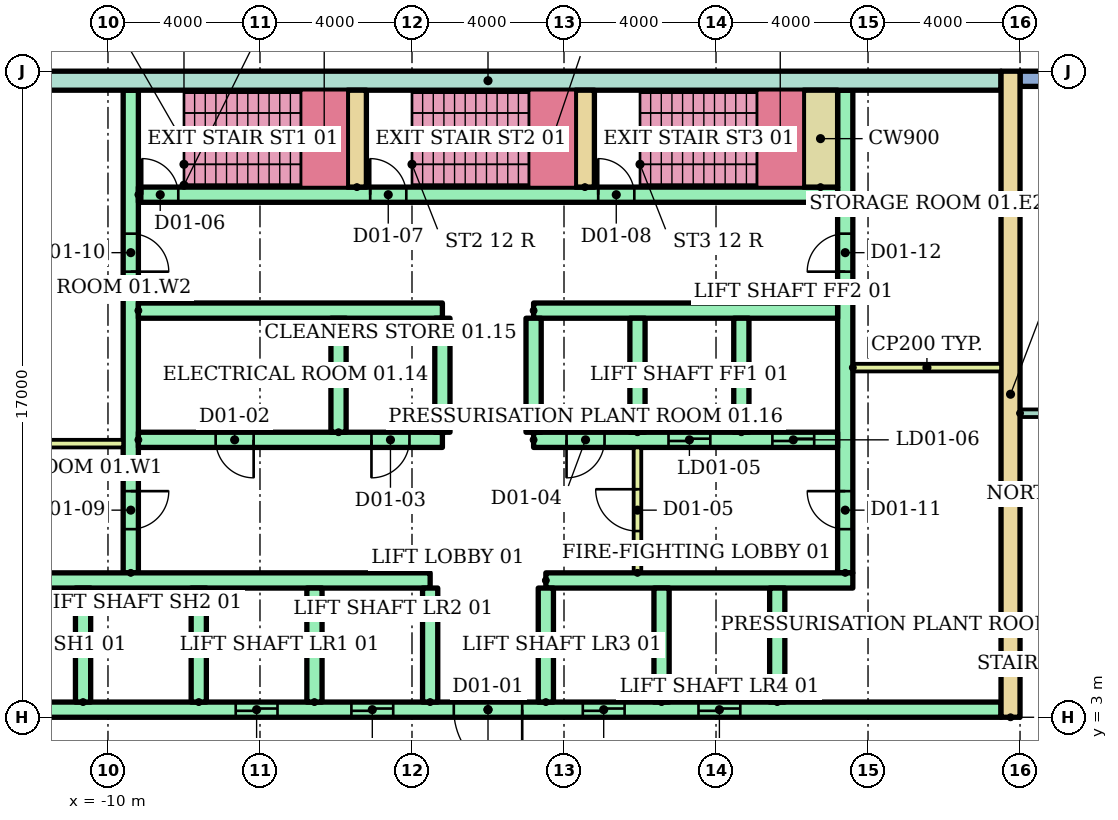
"""IFC4 building model, lengths in metres.
Left out: names, types, materials, properties, quantities, classifications, styles, units other than length and angle.
Written with IfcOpenShell. Run it as: python <this file> out.ifc"""

import sys

from ifc_helpers import new_model, si_unit, direction, frame, frame_2d, origin, place, context, subcontext, project, spatial, rectangle, extrude, element, fill, save


model = new_model("IFC4")
c1 = context("Model", 3, precision=1e-05, world=origin(), true_north=direction((0.0, 1.0)))
c2 = subcontext(c1, "Body", "Model", "MODEL_VIEW")
j1 = project(units=[si_unit("LENGTHUNIT", "METRE"), si_unit("PLANEANGLEUNIT", "RADIAN")], contexts=[c1])
p1 = place(None, origin())
s1 = spatial("IfcSite", under=j1, at=p1, CompositionType="ELEMENT")
p2 = place(p1, origin())
s2 = spatial("IfcBuilding", under=s1, at=p2, CompositionType="ELEMENT")
p3 = place(p2, frame((0.0, 0.0, 6.0)))
s3 = spatial("IfcBuildingStorey", under=s2, at=p3, CompositionType="ELEMENT", Elevation=6.0)
p4 = place(p3, frame((39.6, 19.8, 0.0), z_axis=(0.0, 0.0, 1.0), x_axis=(-1.0, 0.0, 0.0)))
e1 = element("IfcWall", 1, at=p4, inside=s3, PredefinedType="STANDARD", context=c2, shape_type="SweptSolid", body=[
    extrude(rectangle(XDim=25.6, YDim=0.4, at=frame_2d((12.8, 0.0))), origin(), (0.0, 0.0, 1.0), 3.7),
])
p5 = place(p4, frame((10.135, 0.0, 0.9)))
e2 = element("IfcOpeningElement", 2, at=p5, cuts=e1, PredefinedType="OPENING", context=c2, shape_type="SweptSolid", body=[
    extrude(rectangle(XDim=2.4, YDim=2.1, at=frame_2d((1.2, 1.05))), frame((0.0, 0.21, 0.0), z_axis=(0.0, -1.0, 0.0), x_axis=(1.0, 0.0, 0.0)), (0.0, 0.0, 1.0), 0.42),
])
p6 = place(p4, frame((14.665, 0.0, 0.9)))
e3 = element("IfcOpeningElement", 3, at=p6, cuts=e1, PredefinedType="OPENING", context=c2, shape_type="SweptSolid", body=[
    extrude(rectangle(XDim=2.4, YDim=2.1, at=frame_2d((1.2, 1.05))), frame((0.0, 0.21, 0.0), z_axis=(0.0, -1.0, 0.0), x_axis=(1.0, 0.0, 0.0)), (0.0, 0.0, 1.0), 0.42),
])
p7 = place(p4, frame((22.665, 0.0, 0.9)))
e4 = element("IfcOpeningElement", 4, at=p7, cuts=e1, PredefinedType="OPENING", context=c2, shape_type="SweptSolid", body=[
    extrude(rectangle(XDim=2.4, YDim=2.1, at=frame_2d((1.2, 1.05))), frame((0.0, 0.21, 0.0), z_axis=(0.0, -1.0, 0.0), x_axis=(1.0, 0.0, 0.0)), (0.0, 0.0, 1.0), 0.42),
])
p8 = place(p3, frame((13.75, 3.0, 0.0), z_axis=(0.0, 0.0, 1.0), x_axis=(0.0, 1.0, 0.0)))
e5 = element("IfcWall", 5, at=p8, inside=s3, PredefinedType="SHEAR", context=c2, shape_type="SweptSolid", body=[
    extrude(rectangle(XDim=17.0, YDim=0.5, at=frame_2d((8.5, 0.0))), origin(), (0.0, 0.0, 1.0), 3.7),
])
p9 = place(p3, frame((-13.5, 19.75, 0.0)))
e6 = element("IfcWall", 6, at=p9, inside=s3, PredefinedType="SHEAR", context=c2, shape_type="SweptSolid", body=[
    extrude(rectangle(XDim=27.0, YDim=0.5, at=frame_2d((13.5, 0.0))), origin(), (0.0, 0.0, 1.0), 3.7),
])
p10 = place(p3, frame((-9.4, 6.8, 0.0), z_axis=(0.0, 0.0, 1.0), x_axis=(0.0, 1.0, 0.0)))
e7 = element("IfcWall", 7, at=p10, inside=s3, PredefinedType="SHEAR", context=c2, shape_type="SweptSolid", body=[
    extrude(rectangle(XDim=12.7, YDim=0.4, at=frame_2d((6.35, 0.0))), origin(), (0.0, 0.0, 1.0), 3.7),
])
p11 = place(p10, frame((1.15, 0.0, 0.0)))
e8 = element("IfcOpeningElement", 8, at=p11, cuts=e7, PredefinedType="OPENING", context=c2, shape_type="SweptSolid", body=[
    extrude(rectangle(XDim=1.0, YDim=2.1, at=frame_2d((0.5, 1.05))), frame((0.0, 0.21, 0.0), z_axis=(0.0, -1.0, 0.0), x_axis=(1.0, 0.0, 0.0)), (0.0, 0.0, 1.0), 0.42),
])
p12 = place(p10, frame((7.925, 0.0, 0.0)))
e9 = element("IfcOpeningElement", 9, at=p12, cuts=e7, PredefinedType="OPENING", context=c2, shape_type="SweptSolid", body=[
    extrude(rectangle(XDim=1.0, YDim=2.1, at=frame_2d((0.5, 1.05))), frame((0.0, 0.21, 0.0), z_axis=(0.0, -1.0, 0.0), x_axis=(1.0, 0.0, 0.0)), (0.0, 0.0, 1.0), 0.42),
])
p13 = place(p3, frame((9.4, 6.8, 0.0), z_axis=(0.0, 0.0, 1.0), x_axis=(0.0, 1.0, 0.0)))
e10 = element("IfcWall", 10, at=p13, inside=s3, PredefinedType="SHEAR", context=c2, shape_type="SweptSolid", body=[
    extrude(rectangle(XDim=12.7, YDim=0.4, at=frame_2d((6.35, 0.0))), origin(), (0.0, 0.0, 1.0), 3.7),
])
p14 = place(p13, frame((1.15, 0.0, 0.0)))
e11 = element("IfcOpeningElement", 11, at=p14, cuts=e10, PredefinedType="OPENING", context=c2, shape_type="SweptSolid", body=[
    extrude(rectangle(XDim=1.0, YDim=2.1, at=frame_2d((0.5, 1.05))), frame((0.0, 0.21, 0.0), z_axis=(0.0, -1.0, 0.0), x_axis=(1.0, 0.0, 0.0)), (0.0, 0.0, 1.0), 0.42),
])
p15 = place(p13, frame((7.925, 0.0, 0.0)))
e12 = element("IfcOpeningElement", 12, at=p15, cuts=e10, PredefinedType="OPENING", context=c2, shape_type="SweptSolid", body=[
    extrude(rectangle(XDim=1.0, YDim=2.1, at=frame_2d((0.5, 1.05))), frame((0.0, 0.21, 0.0), z_axis=(0.0, -1.0, 0.0), x_axis=(1.0, 0.0, 0.0)), (0.0, 0.0, 1.0), 0.42),
])
p16 = place(p3, frame((-13.5, 3.2, 0.0)))
e13 = element("IfcWall", 13, at=p16, inside=s3, PredefinedType="SHEAR", context=c2, shape_type="SweptSolid", body=[
    extrude(rectangle(XDim=27.0, YDim=0.4, at=frame_2d((13.5, 0.0))), origin(), (0.0, 0.0, 1.0), 3.7),
])
p17 = place(p16, frame((6.861, 0.0, 0.0)))
e14 = element("IfcOpeningElement", 14, at=p17, cuts=e13, PredefinedType="OPENING", context=c2, shape_type="SweptSolid", body=[
    extrude(rectangle(XDim=1.1, YDim=2.1, at=frame_2d((0.55, 1.05))), frame((0.0, 0.21, 0.0), z_axis=(0.0, -1.0, 0.0), x_axis=(1.0, 0.0, 0.0)), (0.0, 0.0, 1.0), 0.42),
])
p18 = place(p16, frame((9.906, 0.0, 0.0)))
e15 = element("IfcOpeningElement", 15, at=p18, cuts=e13, PredefinedType="OPENING", context=c2, shape_type="SweptSolid", body=[
    extrude(rectangle(XDim=1.1, YDim=2.1, at=frame_2d((0.55, 1.05))), frame((0.0, 0.21, 0.0), z_axis=(0.0, -1.0, 0.0), x_axis=(1.0, 0.0, 0.0)), (0.0, 0.0, 1.0), 0.42),
])
p19 = place(p16, frame((15.994, 0.0, 0.0)))
e16 = element("IfcOpeningElement", 16, at=p19, cuts=e13, PredefinedType="OPENING", context=c2, shape_type="SweptSolid", body=[
    extrude(rectangle(XDim=1.1, YDim=2.1, at=frame_2d((0.55, 1.05))), frame((0.0, 0.21, 0.0), z_axis=(0.0, -1.0, 0.0), x_axis=(1.0, 0.0, 0.0)), (0.0, 0.0, 1.0), 0.42),
])
p20 = place(p16, frame((19.039, 0.0, 0.0)))
e17 = element("IfcOpeningElement", 17, at=p20, cuts=e13, PredefinedType="OPENING", context=c2, shape_type="SweptSolid", body=[
    extrude(rectangle(XDim=1.1, YDim=2.1, at=frame_2d((0.55, 1.05))), frame((0.0, 0.21, 0.0), z_axis=(0.0, -1.0, 0.0), x_axis=(1.0, 0.0, 0.0)), (0.0, 0.0, 1.0), 0.42),
])
p21 = place(p16, frame((12.6, 0.0, 0.0)))
e18 = element("IfcOpeningElement", 18, at=p21, cuts=e13, PredefinedType="OPENING", context=c2, shape_type="SweptSolid", body=[
    extrude(rectangle(XDim=1.8, YDim=2.1, at=frame_2d((0.9, 1.05))), frame((0.0, 0.21, 0.0), z_axis=(0.0, -1.0, 0.0), x_axis=(1.0, 0.0, 0.0)), (0.0, 0.0, 1.0), 0.42),
])
p22 = place(p3, frame((-13.5, 6.6, 0.0)))
e19 = element("IfcWall", 19, at=p22, inside=s3, PredefinedType="SHEAR", context=c2, shape_type="SweptSolid", body=[
    extrude(rectangle(XDim=11.978, YDim=0.4, at=frame_2d((5.989, 0.0))), origin(), (0.0, 0.0, 1.0), 3.7),
])
p23 = place(p3, frame((1.522, 6.6, 0.0)))
e20 = element("IfcWall", 20, at=p23, inside=s3, PredefinedType="SHEAR", context=c2, shape_type="SweptSolid", body=[
    extrude(rectangle(XDim=8.078, YDim=0.4, at=frame_2d((4.039, 0.0))), origin(), (0.0, 0.0, 1.0), 3.7),
])
for number, where, z_axis, x_axis in (
    (21, (-10.656, 3.4, 0.0), (0.0, 0.0, 1.0), (0.0, 1.0, 0.0)),
    (22, (-7.611, 3.4, 0.0), (0.0, 0.0, 1.0), (0.0, 1.0, 0.0)),
    (23, (-4.567, 3.4, 0.0), (0.0, 0.0, 1.0), (0.0, 1.0, 0.0)),
    (24, (-1.522, 3.4, 0.0), (0.0, 0.0, 1.0), (0.0, 1.0, 0.0)),
    (25, (1.522, 3.4, 0.0), (0.0, 0.0, 1.0), (0.0, 1.0, 0.0)),
    (26, (4.567, 3.4, 0.0), (0.0, 0.0, 1.0), (0.0, 1.0, 0.0)),
    (27, (7.611, 3.4, 0.0), (0.0, 0.0, 1.0), (0.0, 1.0, 0.0)),
):
    element("IfcWall", number, at=place(p3, frame(where, z_axis=z_axis, x_axis=x_axis)), inside=s3, PredefinedType="SHEAR", context=c2, shape_type="SweptSolid", body=[
        extrude(rectangle(XDim=3.0, YDim=0.4, at=frame_2d((1.5, 0.0))), origin(), (0.0, 0.0, 1.0), 3.7),
    ])
p24 = place(p3, frame((-9.2, 10.3, 0.0)))
e28 = element("IfcWall", 28, at=p24, inside=s3, PredefinedType="SHEAR", context=c2, shape_type="SweptSolid", body=[
    extrude(rectangle(XDim=8.0, YDim=0.4, at=frame_2d((4.0, 0.0))), origin(), (0.0, 0.0, 1.0), 3.7),
])
p25 = place(p24, frame((2.033, 0.0, 0.0)))
e29 = element("IfcOpeningElement", 29, at=p25, cuts=e28, PredefinedType="OPENING", context=c2, shape_type="SweptSolid", body=[
    extrude(rectangle(XDim=1.0, YDim=2.1, at=frame_2d((0.5, 1.05))), frame((0.0, 0.21, 0.0), z_axis=(0.0, -1.0, 0.0), x_axis=(1.0, 0.0, 0.0)), (0.0, 0.0, 1.0), 0.42),
])
p26 = place(p24, frame((6.133, 0.0, 0.0)))
e30 = element("IfcOpeningElement", 30, at=p26, cuts=e28, PredefinedType="OPENING", context=c2, shape_type="SweptSolid", body=[
    extrude(rectangle(XDim=1.0, YDim=2.1, at=frame_2d((0.5, 1.05))), frame((0.0, 0.21, 0.0), z_axis=(0.0, -1.0, 0.0), x_axis=(1.0, 0.0, 0.0)), (0.0, 0.0, 1.0), 0.42),
])
p27 = place(p3, frame((-9.2, 13.7, 0.0)))
e31 = element("IfcWall", 31, at=p27, inside=s3, PredefinedType="SHEAR", context=c2, shape_type="SweptSolid", body=[
    extrude(rectangle(XDim=8.0, YDim=0.4, at=frame_2d((4.0, 0.0))), origin(), (0.0, 0.0, 1.0), 3.7),
])
p28 = place(p3, frame((1.2, 10.3, 0.0)))
e32 = element("IfcWall", 32, at=p28, inside=s3, PredefinedType="SHEAR", context=c2, shape_type="SweptSolid", body=[
    extrude(rectangle(XDim=8.0, YDim=0.4, at=frame_2d((4.0, 0.0))), origin(), (0.0, 0.0, 1.0), 3.7),
])
p29 = place(p28, frame((3.55, 0.0, 0.0)))
e33 = element("IfcOpeningElement", 33, at=p29, cuts=e32, PredefinedType="OPENING", context=c2, shape_type="SweptSolid", body=[
    extrude(rectangle(XDim=1.1, YDim=2.1, at=frame_2d((0.55, 1.05))), frame((0.0, 0.21, 0.0), z_axis=(0.0, -1.0, 0.0), x_axis=(1.0, 0.0, 0.0)), (0.0, 0.0, 1.0), 0.42),
])
p30 = place(p28, frame((6.283, 0.0, 0.0)))
e34 = element("IfcOpeningElement", 34, at=p30, cuts=e32, PredefinedType="OPENING", context=c2, shape_type="SweptSolid", body=[
    extrude(rectangle(XDim=1.1, YDim=2.1, at=frame_2d((0.55, 1.05))), frame((0.0, 0.21, 0.0), z_axis=(0.0, -1.0, 0.0), x_axis=(1.0, 0.0, 0.0)), (0.0, 0.0, 1.0), 0.42),
])
p31 = place(p28, frame((0.867, 0.0, 0.0)))
e35 = element("IfcOpeningElement", 35, at=p31, cuts=e32, PredefinedType="OPENING", context=c2, shape_type="SweptSolid", body=[
    extrude(rectangle(XDim=1.0, YDim=2.1, at=frame_2d((0.5, 1.05))), frame((0.0, 0.21, 0.0), z_axis=(0.0, -1.0, 0.0), x_axis=(1.0, 0.0, 0.0)), (0.0, 0.0, 1.0), 0.42),
])
p32 = place(p3, frame((1.2, 13.7, 0.0)))
e36 = element("IfcWall", 36, at=p32, inside=s3, PredefinedType="SHEAR", context=c2, shape_type="SweptSolid", body=[
    extrude(rectangle(XDim=8.0, YDim=0.4, at=frame_2d((4.0, 0.0))), origin(), (0.0, 0.0, 1.0), 3.7),
])
for number, where, z_axis, x_axis in (
    (37, (-3.933, 10.5, 0.0), (0.0, 0.0, 1.0), (0.0, 1.0, 0.0)),
    (38, (-1.2, 10.5, 0.0), (0.0, 0.0, 1.0), (0.0, 1.0, 0.0)),
    (39, (1.2, 10.5, 0.0), (0.0, 0.0, 1.0), (0.0, 1.0, 0.0)),
    (40, (3.933, 10.5, 0.0), (0.0, 0.0, 1.0), (0.0, 1.0, 0.0)),
    (41, (6.667, 10.5, 0.0), (0.0, 0.0, 1.0), (0.0, 1.0, 0.0)),
):
    element("IfcWall", number, at=place(p3, frame(where, z_axis=z_axis, x_axis=x_axis)), inside=s3, PredefinedType="SHEAR", context=c2, shape_type="SweptSolid", body=[
        extrude(rectangle(XDim=3.0, YDim=0.4, at=frame_2d((1.5, 0.0))), origin(), (0.0, 0.0, 1.0), 3.7),
    ])
p33 = place(p3, frame((3.933, 6.8, 0.0), z_axis=(0.0, 0.0, 1.0), x_axis=(0.0, 1.0, 0.0)))
e42 = element("IfcWall", 42, at=p33, inside=s3, PredefinedType="PARTITIONING", context=c2, shape_type="SweptSolid", body=[
    extrude(rectangle(XDim=3.3, YDim=0.2, at=frame_2d((1.65, 0.0))), origin(), (0.0, 0.0, 1.0), 3.7),
])
p34 = place(p33, frame((1.1, 0.0, 0.0)))
e43 = element("IfcOpeningElement", 43, at=p34, cuts=e42, PredefinedType="OPENING", context=c2, shape_type="SweptSolid", body=[
    extrude(rectangle(XDim=1.1, YDim=2.1, at=frame_2d((0.55, 1.05))), frame((0.0, 0.11, 0.0), z_axis=(0.0, -1.0, 0.0), x_axis=(1.0, 0.0, 0.0)), (0.0, 0.0, 1.0), 0.22),
])
p35 = place(p3, frame((-9.2, 16.75, 0.0)))
e44 = element("IfcWall", 44, at=p35, inside=s3, PredefinedType="SHEAR", context=c2, shape_type="SweptSolid", body=[
    extrude(rectangle(XDim=18.4, YDim=0.4, at=frame_2d((9.2, 0.0))), origin(), (0.0, 0.0, 1.0), 3.7),
])
p36 = place(p35, frame((0.1, 0.0, 0.0)))
e45 = element("IfcOpeningElement", 45, at=p36, cuts=e44, PredefinedType="OPENING", context=c2, shape_type="SweptSolid", body=[
    extrude(rectangle(XDim=0.95, YDim=2.1, at=frame_2d((0.475, 1.05))), frame((0.0, 0.21, 0.0), z_axis=(0.0, -1.0, 0.0), x_axis=(1.0, 0.0, 0.0)), (0.0, 0.0, 1.0), 0.42),
])
p37 = place(p35, frame((6.1, 0.0, 0.0)))
e46 = element("IfcOpeningElement", 46, at=p37, cuts=e44, PredefinedType="OPENING", context=c2, shape_type="SweptSolid", body=[
    extrude(rectangle(XDim=0.95, YDim=2.1, at=frame_2d((0.475, 1.05))), frame((0.0, 0.21, 0.0), z_axis=(0.0, -1.0, 0.0), x_axis=(1.0, 0.0, 0.0)), (0.0, 0.0, 1.0), 0.42),
])
p38 = place(p35, frame((12.1, 0.0, 0.0)))
e47 = element("IfcOpeningElement", 47, at=p38, cuts=e44, PredefinedType="OPENING", context=c2, shape_type="SweptSolid", body=[
    extrude(rectangle(XDim=0.95, YDim=2.1, at=frame_2d((0.475, 1.05))), frame((0.0, 0.21, 0.0), z_axis=(0.0, -1.0, 0.0), x_axis=(1.0, 0.0, 0.0)), (0.0, 0.0, 1.0), 0.42),
])
for number, where, z_axis, x_axis in (
    (48, (-3.45, 16.95, 0.0), (0.0, 0.0, 1.0), (0.0, 1.0, 0.0)),
    (49, (2.55, 16.95, 0.0), (0.0, 0.0, 1.0), (0.0, 1.0, 0.0)),
):
    element("IfcWall", number, at=place(p3, frame(where, z_axis=z_axis, x_axis=x_axis)), inside=s3, PredefinedType="SHEAR", context=c2, shape_type="SweptSolid", body=[
        extrude(rectangle(XDim=2.55, YDim=0.5, at=frame_2d((1.275, 0.0))), origin(), (0.0, 0.0, 1.0), 3.7),
    ])
p39 = place(p3, frame((8.75, 16.95, 0.0), z_axis=(0.0, 0.0, 1.0), x_axis=(0.0, 1.0, 0.0)))
e50 = element("IfcWall", 50, at=p39, inside=s3, PredefinedType="SHEAR", context=c2, shape_type="SweptSolid", body=[
    extrude(rectangle(XDim=2.55, YDim=0.9, at=frame_2d((1.275, 0.0))), origin(), (0.0, 0.0, 1.0), 3.7),
])
for number, where in (
    (51, (-13.5, 10.2, 0.0)),
    (52, (9.6, 12.2, 0.0)),
):
    element("IfcWall", number, at=place(p3, frame(where)), inside=s3, PredefinedType="PARTITIONING", context=c2, shape_type="SweptSolid", body=[
        extrude(rectangle(XDim=3.9, YDim=0.2, at=frame_2d((1.95, 0.0))), origin(), (0.0, 0.0, 1.0), 3.7),
    ])
p40 = place(p3, frame((14.0, 11.0, 0.0)))
e53 = element("IfcWall", 53, at=p40, inside=s3, PredefinedType="PARTITIONING", context=c2, shape_type="SweptSolid", body=[
    extrude(rectangle(XDim=3.5, YDim=0.2, at=frame_2d((1.75, 0.0))), origin(), (0.0, 0.0, 1.0), 3.7),
])
p41 = place(p17, origin())
e54 = element("IfcDoor", 54, at=p41, inside=s3, OperationType="SLIDING_TO_LEFT", PredefinedType="DOOR", context=c2, shape_type="SweptSolid", body=[
    extrude(rectangle(XDim=1.1, YDim=2.1, at=frame_2d((0.55, 1.05))), frame((0.0, 0.025, 0.0), z_axis=(0.0, -1.0, 0.0), x_axis=(1.0, 0.0, 0.0)), (0.0, 0.0, 1.0), 0.05),
])
fill(e14, e54)
p42 = place(p18, origin())
e55 = element("IfcDoor", 55, at=p42, inside=s3, OperationType="SLIDING_TO_LEFT", PredefinedType="DOOR", context=c2, shape_type="SweptSolid", body=[
    extrude(rectangle(XDim=1.1, YDim=2.1, at=frame_2d((0.55, 1.05))), frame((0.0, 0.025, 0.0), z_axis=(0.0, -1.0, 0.0), x_axis=(1.0, 0.0, 0.0)), (0.0, 0.0, 1.0), 0.05),
])
fill(e15, e55)
p43 = place(p19, origin())
e56 = element("IfcDoor", 56, at=p43, inside=s3, OperationType="SLIDING_TO_LEFT", PredefinedType="DOOR", context=c2, shape_type="SweptSolid", body=[
    extrude(rectangle(XDim=1.1, YDim=2.1, at=frame_2d((0.55, 1.05))), frame((0.0, 0.025, 0.0), z_axis=(0.0, -1.0, 0.0), x_axis=(1.0, 0.0, 0.0)), (0.0, 0.0, 1.0), 0.05),
])
fill(e16, e56)
p44 = place(p20, origin())
e57 = element("IfcDoor", 57, at=p44, inside=s3, OperationType="SLIDING_TO_LEFT", PredefinedType="DOOR", context=c2, shape_type="SweptSolid", body=[
    extrude(rectangle(XDim=1.1, YDim=2.1, at=frame_2d((0.55, 1.05))), frame((0.0, 0.025, 0.0), z_axis=(0.0, -1.0, 0.0), x_axis=(1.0, 0.0, 0.0)), (0.0, 0.0, 1.0), 0.05),
])
fill(e17, e57)
p45 = place(p21, frame((1.8, 0.0, 0.0), z_axis=(0.0, 0.0, 1.0), x_axis=(-1.0, 0.0, 0.0)))
e58 = element("IfcDoor", 58, at=p45, inside=s3, OperationType="DOUBLE_DOOR_SINGLE_SWING", PredefinedType="DOOR", context=c2, shape_type="SweptSolid", body=[
    extrude(rectangle(XDim=1.8, YDim=2.1, at=frame_2d((0.9, 1.05))), frame((0.0, 0.025, 0.0), z_axis=(0.0, -1.0, 0.0), x_axis=(1.0, 0.0, 0.0)), (0.0, 0.0, 1.0), 0.05),
])
fill(e18, e58)
p46 = place(p29, origin())
e59 = element("IfcDoor", 59, at=p46, inside=s3, OperationType="SLIDING_TO_LEFT", PredefinedType="DOOR", context=c2, shape_type="SweptSolid", body=[
    extrude(rectangle(XDim=1.1, YDim=2.1, at=frame_2d((0.55, 1.05))), frame((0.0, 0.025, 0.0), z_axis=(0.0, -1.0, 0.0), x_axis=(1.0, 0.0, 0.0)), (0.0, 0.0, 1.0), 0.05),
])
fill(e33, e59)
p47 = place(p30, origin())
e60 = element("IfcDoor", 60, at=p47, inside=s3, OperationType="SLIDING_TO_LEFT", PredefinedType="DOOR", context=c2, shape_type="SweptSolid", body=[
    extrude(rectangle(XDim=1.1, YDim=2.1, at=frame_2d((0.55, 1.05))), frame((0.0, 0.025, 0.0), z_axis=(0.0, -1.0, 0.0), x_axis=(1.0, 0.0, 0.0)), (0.0, 0.0, 1.0), 0.05),
])
fill(e34, e60)
p48 = place(p25, frame((1.0, 0.0, 0.0), z_axis=(0.0, 0.0, 1.0), x_axis=(-1.0, 0.0, 0.0)))
e61 = element("IfcDoor", 61, at=p48, inside=s3, OperationType="SINGLE_SWING_RIGHT", PredefinedType="DOOR", context=c2, shape_type="SweptSolid", body=[
    extrude(rectangle(XDim=1.0, YDim=2.1, at=frame_2d((0.5, 1.05))), frame((0.0, 0.025, 0.0), z_axis=(0.0, -1.0, 0.0), x_axis=(1.0, 0.0, 0.0)), (0.0, 0.0, 1.0), 0.05),
])
fill(e29, e61)
p49 = place(p26, frame((1.0, 0.0, 0.0), z_axis=(0.0, 0.0, 1.0), x_axis=(-1.0, 0.0, 0.0)))
e62 = element("IfcDoor", 62, at=p49, inside=s3, OperationType="SINGLE_SWING_LEFT", PredefinedType="DOOR", context=c2, shape_type="SweptSolid", body=[
    extrude(rectangle(XDim=1.0, YDim=2.1, at=frame_2d((0.5, 1.05))), frame((0.0, 0.025, 0.0), z_axis=(0.0, -1.0, 0.0), x_axis=(1.0, 0.0, 0.0)), (0.0, 0.0, 1.0), 0.05),
])
fill(e30, e62)
p50 = place(p31, frame((1.0, 0.0, 0.0), z_axis=(0.0, 0.0, 1.0), x_axis=(-1.0, 0.0, 0.0)))
e63 = element("IfcDoor", 63, at=p50, inside=s3, OperationType="SINGLE_SWING_LEFT", PredefinedType="DOOR", context=c2, shape_type="SweptSolid", body=[
    extrude(rectangle(XDim=1.0, YDim=2.1, at=frame_2d((0.5, 1.05))), frame((0.0, 0.025, 0.0), z_axis=(0.0, -1.0, 0.0), x_axis=(1.0, 0.0, 0.0)), (0.0, 0.0, 1.0), 0.05),
])
fill(e35, e63)
p51 = place(p34, origin())
e64 = element("IfcDoor", 64, at=p51, inside=s3, OperationType="SINGLE_SWING_RIGHT", PredefinedType="DOOR", context=c2, shape_type="SweptSolid", body=[
    extrude(rectangle(XDim=1.1, YDim=2.1, at=frame_2d((0.55, 1.05))), frame((0.0, 0.025, 0.0), z_axis=(0.0, -1.0, 0.0), x_axis=(1.0, 0.0, 0.0)), (0.0, 0.0, 1.0), 0.05),
])
fill(e43, e64)
p52 = place(p36, origin())
e65 = element("IfcDoor", 65, at=p52, inside=s3, OperationType="SINGLE_SWING_LEFT", PredefinedType="DOOR", context=c2, shape_type="SweptSolid", body=[
    extrude(rectangle(XDim=0.95, YDim=2.1, at=frame_2d((0.475, 1.05))), frame((0.0, 0.025, 0.0), z_axis=(0.0, -1.0, 0.0), x_axis=(1.0, 0.0, 0.0)), (0.0, 0.0, 1.0), 0.05),
])
fill(e45, e65)
p53 = place(p37, origin())
e66 = element("IfcDoor", 66, at=p53, inside=s3, OperationType="SINGLE_SWING_LEFT", PredefinedType="DOOR", context=c2, shape_type="SweptSolid", body=[
    extrude(rectangle(XDim=0.95, YDim=2.1, at=frame_2d((0.475, 1.05))), frame((0.0, 0.025, 0.0), z_axis=(0.0, -1.0, 0.0), x_axis=(1.0, 0.0, 0.0)), (0.0, 0.0, 1.0), 0.05),
])
fill(e46, e66)
p54 = place(p38, origin())
e67 = element("IfcDoor", 67, at=p54, inside=s3, OperationType="SINGLE_SWING_LEFT", PredefinedType="DOOR", context=c2, shape_type="SweptSolid", body=[
    extrude(rectangle(XDim=0.95, YDim=2.1, at=frame_2d((0.475, 1.05))), frame((0.0, 0.025, 0.0), z_axis=(0.0, -1.0, 0.0), x_axis=(1.0, 0.0, 0.0)), (0.0, 0.0, 1.0), 0.05),
])
fill(e47, e67)
p55 = place(p11, frame((1.0, 0.0, 0.0), z_axis=(0.0, 0.0, 1.0), x_axis=(-1.0, 0.0, 0.0)))
e68 = element("IfcDoor", 68, at=p55, inside=s3, OperationType="SINGLE_SWING_RIGHT", PredefinedType="DOOR", context=c2, shape_type="SweptSolid", body=[
    extrude(rectangle(XDim=1.0, YDim=2.1, at=frame_2d((0.5, 1.05))), frame((0.0, 0.025, 0.0), z_axis=(0.0, -1.0, 0.0), x_axis=(1.0, 0.0, 0.0)), (0.0, 0.0, 1.0), 0.05),
])
fill(e8, e68)
p56 = place(p12, frame((1.0, 0.0, 0.0), z_axis=(0.0, 0.0, 1.0), x_axis=(-1.0, 0.0, 0.0)))
e69 = element("IfcDoor", 69, at=p56, inside=s3, OperationType="SINGLE_SWING_LEFT", PredefinedType="DOOR", context=c2, shape_type="SweptSolid", body=[
    extrude(rectangle(XDim=1.0, YDim=2.1, at=frame_2d((0.5, 1.05))), frame((0.0, 0.025, 0.0), z_axis=(0.0, -1.0, 0.0), x_axis=(1.0, 0.0, 0.0)), (0.0, 0.0, 1.0), 0.05),
])
fill(e9, e69)
p57 = place(p14, origin())
e70 = element("IfcDoor", 70, at=p57, inside=s3, OperationType="SINGLE_SWING_RIGHT", PredefinedType="DOOR", context=c2, shape_type="SweptSolid", body=[
    extrude(rectangle(XDim=1.0, YDim=2.1, at=frame_2d((0.5, 1.05))), frame((0.0, 0.025, 0.0), z_axis=(0.0, -1.0, 0.0), x_axis=(1.0, 0.0, 0.0)), (0.0, 0.0, 1.0), 0.05),
])
fill(e11, e70)
p58 = place(p15, origin())
e71 = element("IfcDoor", 71, at=p58, inside=s3, OperationType="SINGLE_SWING_LEFT", PredefinedType="DOOR", context=c2, shape_type="SweptSolid", body=[
    extrude(rectangle(XDim=1.0, YDim=2.1, at=frame_2d((0.5, 1.05))), frame((0.0, 0.025, 0.0), z_axis=(0.0, -1.0, 0.0), x_axis=(1.0, 0.0, 0.0)), (0.0, 0.0, 1.0), 0.05),
])
fill(e12, e71)
save(model, sys.argv[1])
